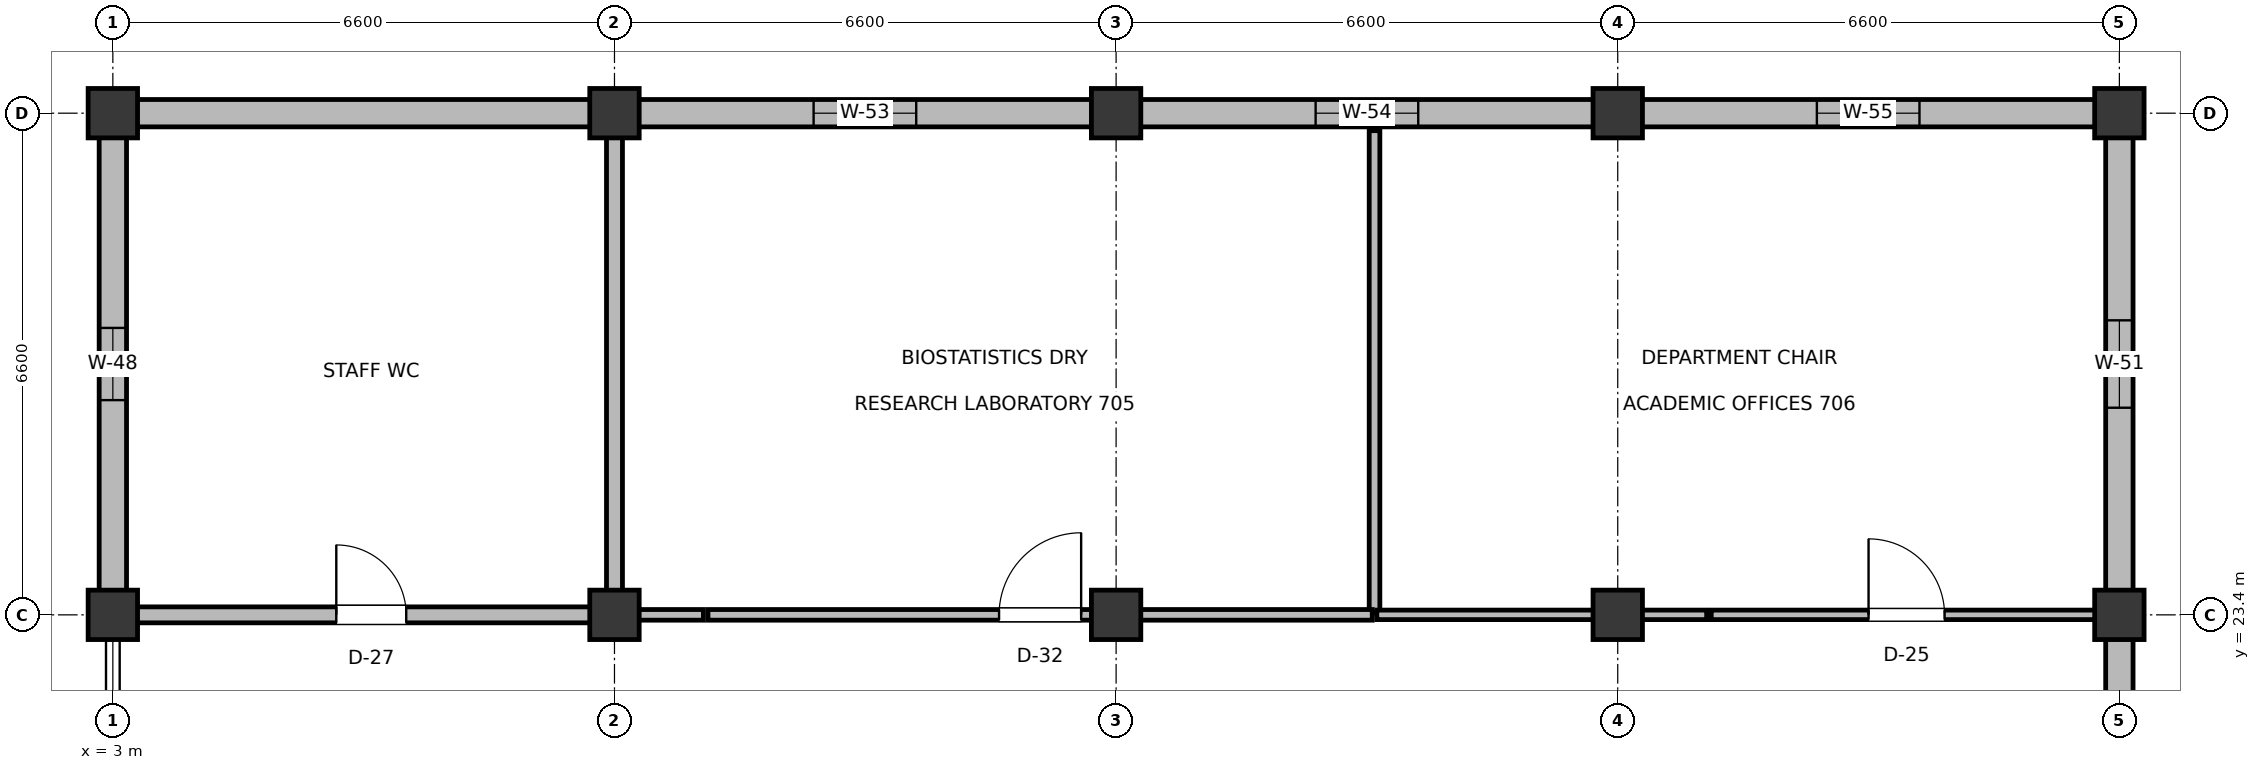
"""IFC4 building model, lengths in metres.
Left out: names, types, materials, properties, quantities, classifications, styles, units other than length and angle.
Written with IfcOpenShell. Run it as: python <this file> out.ifc"""

import sys

from ifc_helpers import new_model, si_unit, direction, frame, frame_2d, origin, origin_2d, place, context, subcontext, project, spatial, rectangle, extrude, element, fill, save


model = new_model("IFC4")
c1 = context("Model", 3, precision=1e-05, world=origin(), true_north=direction((0.0, 1.0)))
c2 = subcontext(c1, "Body", "Model", "MODEL_VIEW")
j1 = project(units=[si_unit("LENGTHUNIT", "METRE"), si_unit("PLANEANGLEUNIT", "RADIAN")], contexts=[c1])
p1 = place(None, origin())
s1 = spatial("IfcSite", under=j1, at=p1, CompositionType="ELEMENT")
p2 = place(p1, origin())
s2 = spatial("IfcBuilding", under=s1, at=p2, CompositionType="ELEMENT")
p3 = place(p2, frame((0.0, 0.0, 33.0)))
s3 = spatial("IfcBuildingStorey", under=s2, at=p3, CompositionType="ELEMENT", Elevation=33.0)
for number, where, z_axis, x_axis in (
    (1, (3.0, 23.4, 0.0), (0.0, 0.0, 1.0), (1.0, 0.0, 0.0)),
    (2, (3.0, 30.0, 0.0), (0.0, 0.0, 1.0), (1.0, 0.0, 0.0)),
    (3, (9.6, 23.4, 0.0), (0.0, 0.0, 1.0), (1.0, 0.0, 0.0)),
    (4, (9.6, 30.0, 0.0), (0.0, 0.0, 1.0), (1.0, 0.0, 0.0)),
    (5, (16.2, 23.4, 0.0), (0.0, 0.0, 1.0), (1.0, 0.0, 0.0)),
    (6, (16.2, 30.0, 0.0), (0.0, 0.0, 1.0), (1.0, 0.0, 0.0)),
    (7, (22.8, 23.4, 0.0), (0.0, 0.0, 1.0), (1.0, 0.0, 0.0)),
    (8, (22.8, 30.0, 0.0), (0.0, 0.0, 1.0), (1.0, 0.0, 0.0)),
    (9, (29.4, 23.4, 0.0), (0.0, 0.0, 1.0), (1.0, 0.0, 0.0)),
    (10, (29.4, 30.0, 0.0), (0.0, 0.0, 1.0), (1.0, 0.0, 0.0)),
):
    element("IfcColumn", number, at=place(p3, frame(where, z_axis=z_axis, x_axis=x_axis)), inside=s3, PredefinedType="COLUMN", context=c2, shape_type="SweptSolid", body=[
        extrude(rectangle(XDim=0.65, YDim=0.65, at=origin_2d()), origin(), (0.0, 0.0, 1.0), 3.8),
    ])
p4 = place(p3, frame((3.0, 23.705, 0.0), z_axis=(0.0, 0.0, 1.0), x_axis=(0.0, 1.0, 0.0)))
e11 = element("IfcWall", 11, at=p4, inside=s3, PredefinedType="SOLIDWALL", context=c2, shape_type="SweptSolid", body=[
    extrude(rectangle(XDim=5.99, YDim=0.36, at=frame_2d((2.995, 0.0))), origin(), (0.0, 0.0, 1.0), 2.825),
])
p5 = place(p4, frame((2.52, 0.0, 0.9)))
e12 = element("IfcOpeningElement", 12, at=p5, cuts=e11, PredefinedType="OPENING", context=c2, shape_type="SweptSolid", body=[
    extrude(rectangle(XDim=0.95, YDim=1.75, at=frame_2d((0.475, 0.875))), frame((0.0, 0.19, 0.0), z_axis=(0.0, -1.0, 0.0), x_axis=(1.0, 0.0, 0.0)), (0.0, 0.0, 1.0), 0.38),
])
p6 = place(p3, frame((29.4, 9.315, 0.0), z_axis=(0.0, 0.0, 1.0), x_axis=(0.0, 1.0, 0.0)))
e13 = element("IfcWall", 13, at=p6, inside=s3, PredefinedType="SOLIDWALL", context=c2, shape_type="SweptSolid", body=[
    extrude(rectangle(XDim=13.77, YDim=0.36, at=frame_2d((6.885, 0.0))), origin(), (0.0, 0.0, 1.0), 2.725),
])
p7 = place(p6, frame((6.31, 0.0, 0.9)))
e14 = element("IfcOpeningElement", 14, at=p7, cuts=e13, PredefinedType="OPENING", context=c2, shape_type="SweptSolid", body=[
    extrude(rectangle(XDim=1.15, YDim=1.35, at=frame_2d((0.575, 0.675))), frame((0.0, 0.19, 0.0), z_axis=(0.0, -1.0, 0.0), x_axis=(1.0, 0.0, 0.0)), (0.0, 0.0, 1.0), 0.38),
])
p8 = place(p3, frame((29.4, 23.705, 0.0), z_axis=(0.0, 0.0, 1.0), x_axis=(0.0, 1.0, 0.0)))
e15 = element("IfcWall", 15, at=p8, inside=s3, PredefinedType="SOLIDWALL", context=c2, shape_type="SweptSolid", body=[
    extrude(rectangle(XDim=5.99, YDim=0.36, at=frame_2d((2.995, 0.0))), origin(), (0.0, 0.0, 1.0), 2.875),
])
p9 = place(p8, frame((2.42, 0.0, 0.9)))
e16 = element("IfcOpeningElement", 16, at=p9, cuts=e15, PredefinedType="OPENING", context=c2, shape_type="SweptSolid", body=[
    extrude(rectangle(XDim=1.15, YDim=1.55, at=frame_2d((0.575, 0.775))), frame((0.0, 0.19, 0.0), z_axis=(0.0, -1.0, 0.0), x_axis=(1.0, 0.0, 0.0)), (0.0, 0.0, 1.0), 0.38),
])
p10 = place(p3, frame((3.305, 30.0, 0.0), z_axis=(0.0, 0.0, 1.0), x_axis=(1.0, 0.0, 0.0)))
e17 = element("IfcWall", 17, at=p10, inside=s3, PredefinedType="SOLIDWALL", context=c2, shape_type="SweptSolid", body=[
    extrude(rectangle(XDim=5.98, YDim=0.36, at=frame_2d((2.99, 0.0))), origin(), (0.0, 0.0, 1.0), 2.605),
])
p11 = place(p3, frame((9.905, 30.0, 0.0), z_axis=(0.0, 0.0, 1.0), x_axis=(1.0, 0.0, 0.0)))
e18 = element("IfcWall", 18, at=p11, inside=s3, PredefinedType="SOLIDWALL", context=c2, shape_type="SweptSolid", body=[
    extrude(rectangle(XDim=5.98, YDim=0.36, at=frame_2d((2.99, 0.0))), origin(), (0.0, 0.0, 1.0), 2.775),
])
p12 = place(p11, frame((2.315, 0.0, 0.9)))
e19 = element("IfcOpeningElement", 19, at=p12, cuts=e18, PredefinedType="OPENING", context=c2, shape_type="SweptSolid", body=[
    extrude(rectangle(XDim=1.35, YDim=1.15, at=frame_2d((0.675, 0.575))), frame((0.0, 0.19, 0.0), z_axis=(0.0, -1.0, 0.0), x_axis=(1.0, 0.0, 0.0)), (0.0, 0.0, 1.0), 0.38),
])
p13 = place(p3, frame((16.505, 30.0, 0.0), z_axis=(0.0, 0.0, 1.0), x_axis=(1.0, 0.0, 0.0)))
e20 = element("IfcWall", 20, at=p13, inside=s3, PredefinedType="SOLIDWALL", context=c2, shape_type="SweptSolid", body=[
    extrude(rectangle(XDim=5.99, YDim=0.36, at=frame_2d((2.995, 0.0))), origin(), (0.0, 0.0, 1.0), 3.005),
])
p14 = place(p13, frame((2.32, 0.0, 0.9)))
e21 = element("IfcOpeningElement", 21, at=p14, cuts=e20, PredefinedType="OPENING", context=c2, shape_type="SweptSolid", body=[
    extrude(rectangle(XDim=1.35, YDim=1.35, at=frame_2d((0.675, 0.675))), frame((0.0, 0.19, 0.0), z_axis=(0.0, -1.0, 0.0), x_axis=(1.0, 0.0, 0.0)), (0.0, 0.0, 1.0), 0.38),
])
p15 = place(p3, frame((23.105, 30.0, 0.0), z_axis=(0.0, 0.0, 1.0), x_axis=(1.0, 0.0, 0.0)))
e22 = element("IfcWall", 22, at=p15, inside=s3, PredefinedType="SOLIDWALL", context=c2, shape_type="SweptSolid", body=[
    extrude(rectangle(XDim=5.98, YDim=0.36, at=frame_2d((2.99, 0.0))), origin(), (0.0, 0.0, 1.0), 2.775),
])
p16 = place(p15, frame((2.315, 0.0, 0.9)))
e23 = element("IfcOpeningElement", 23, at=p16, cuts=e22, PredefinedType="OPENING", context=c2, shape_type="SweptSolid", body=[
    extrude(rectangle(XDim=1.35, YDim=1.55, at=frame_2d((0.675, 0.775))), frame((0.0, 0.19, 0.0), z_axis=(0.0, -1.0, 0.0), x_axis=(1.0, 0.0, 0.0)), (0.0, 0.0, 1.0), 0.38),
])
p17 = place(p3, frame((9.6, 23.43, 0.0), z_axis=(0.0, 0.0, 1.0), x_axis=(0.0, 1.0, 0.0)))
e24 = element("IfcWall", 24, at=p17, inside=s3, PredefinedType="PLUMBINGWALL", context=c2, shape_type="SweptSolid", body=[
    extrude(rectangle(XDim=6.34, YDim=0.21, at=frame_2d((3.17, 0.0))), origin(), (0.0, 0.0, 1.0), 2.875),
])
p18 = place(p3, frame((3.23, 23.4, 0.0), z_axis=(0.0, 0.0, 1.0), x_axis=(1.0, 0.0, 0.0)))
e25 = element("IfcWall", 25, at=p18, inside=s3, PredefinedType="PLUMBINGWALL", context=c2, shape_type="SweptSolid", body=[
    extrude(rectangle(XDim=6.34, YDim=0.21, at=frame_2d((3.17, 0.0))), origin(), (0.0, 0.0, 1.0), 2.665),
])
p19 = place(p18, frame((2.71, 0.0, 0.0)))
e26 = element("IfcOpeningElement", 26, at=p19, cuts=e25, PredefinedType="OPENING", context=c2, shape_type="SweptSolid", body=[
    extrude(rectangle(XDim=0.92, YDim=2.1, at=frame_2d((0.46, 1.05))), frame((0.0, 0.115, 0.0), z_axis=(0.0, -1.0, 0.0), x_axis=(1.0, 0.0, 0.0)), (0.0, 0.0, 1.0), 0.23),
])
p20 = place(p3, frame((19.6, 23.43, 0.0), z_axis=(0.0, 0.0, 1.0), x_axis=(0.0, 1.0, 0.0)))
e27 = element("IfcWall", 27, at=p20, inside=s3, PredefinedType="PARTITIONING", context=c2, shape_type="SweptSolid", body=[
    extrude(rectangle(XDim=6.34, YDim=0.14, at=frame_2d((3.17, 0.0))), origin(), (0.0, 0.0, 1.0), 2.645),
])
p21 = place(p3, frame((9.63, 23.4, 0.0), z_axis=(0.0, 0.0, 1.0), x_axis=(1.0, 0.0, 0.0)))
e28 = element("IfcWall", 28, at=p21, inside=s3, PredefinedType="PARTITIONING", context=c2, shape_type="SweptSolid", body=[
    extrude(rectangle(XDim=1.14, YDim=0.14, at=frame_2d((0.57, 0.0))), origin(), (0.0, 0.0, 1.0), 2.775),
])
p22 = place(p3, frame((10.83, 23.4, 0.0), z_axis=(0.0, 0.0, 1.0), x_axis=(1.0, 0.0, 0.0)))
e29 = element("IfcWall", 29, at=p22, inside=s3, PredefinedType="PARTITIONING", context=c2, shape_type="SweptSolid", body=[
    extrude(rectangle(XDim=8.74, YDim=0.14, at=frame_2d((4.37, 0.0))), origin(), (0.0, 0.0, 1.0), 2.645),
])
p23 = place(p22, frame((3.83, 0.0, 0.0)))
e30 = element("IfcOpeningElement", 30, at=p23, cuts=e29, PredefinedType="OPENING", context=c2, shape_type="SweptSolid", body=[
    extrude(rectangle(XDim=1.08, YDim=2.15, at=frame_2d((0.54, 1.075))), frame((0.0, 0.08, 0.0), z_axis=(0.0, -1.0, 0.0), x_axis=(1.0, 0.0, 0.0)), (0.0, 0.0, 1.0), 0.16),
])
p24 = place(p3, frame((24.03, 23.4, 0.0), z_axis=(0.0, 0.0, 1.0), x_axis=(1.0, 0.0, 0.0)))
e31 = element("IfcWall", 31, at=p24, inside=s3, PredefinedType="PARTITIONING", context=c2, shape_type="SweptSolid", body=[
    extrude(rectangle(XDim=5.14, YDim=0.125, at=frame_2d((2.57, 0.0))), origin(), (0.0, 0.0, 1.0), 2.775),
])
p25 = place(p24, frame((2.07, 0.0, 0.0)))
e32 = element("IfcOpeningElement", 32, at=p25, cuts=e31, PredefinedType="OPENING", context=c2, shape_type="SweptSolid", body=[
    extrude(rectangle(XDim=1.0, YDim=2.15, at=frame_2d((0.5, 1.075))), frame((0.0, 0.073, 0.0), z_axis=(0.0, -1.0, 0.0), x_axis=(1.0, 0.0, 0.0)), (0.0, 0.0, 1.0), 0.145),
])
p26 = place(p3, frame((19.63, 23.4, 0.0), z_axis=(0.0, 0.0, 1.0), x_axis=(1.0, 0.0, 0.0)))
e33 = element("IfcWall", 33, at=p26, inside=s3, PredefinedType="PARTITIONING", context=c2, shape_type="SweptSolid", body=[
    extrude(rectangle(XDim=4.34, YDim=0.125, at=frame_2d((2.17, 0.0))), origin(), (0.0, 0.0, 1.0), 2.645),
])
p27 = place(p5, origin())
e34 = element("IfcWindow", 34, at=p27, inside=s3, PartitioningType="DOUBLE_PANEL_VERTICAL", PredefinedType="WINDOW", context=c2, shape_type="SweptSolid", body=[
    extrude(rectangle(XDim=0.95, YDim=1.75, at=frame_2d((0.475, 0.875))), frame((0.0, 0.03, 0.0), z_axis=(0.0, -1.0, 0.0), x_axis=(1.0, 0.0, 0.0)), (0.0, 0.0, 1.0), 0.06),
])
fill(e12, e34)
p28 = place(p9, frame((1.15, 0.0, 0.0), z_axis=(0.0, 0.0, 1.0), x_axis=(-1.0, 0.0, 0.0)))
e35 = element("IfcWindow", 35, at=p28, inside=s3, PartitioningType="DOUBLE_PANEL_VERTICAL", PredefinedType="WINDOW", context=c2, shape_type="SweptSolid", body=[
    extrude(rectangle(XDim=1.15, YDim=1.55, at=frame_2d((0.575, 0.775))), frame((0.0, 0.03, 0.0), z_axis=(0.0, -1.0, 0.0), x_axis=(1.0, 0.0, 0.0)), (0.0, 0.0, 1.0), 0.06),
])
fill(e16, e35)
p29 = place(p12, origin())
e36 = element("IfcWindow", 36, at=p29, inside=s3, PartitioningType="DOUBLE_PANEL_VERTICAL", PredefinedType="WINDOW", context=c2, shape_type="SweptSolid", body=[
    extrude(rectangle(XDim=1.35, YDim=1.15, at=frame_2d((0.675, 0.575))), frame((0.0, 0.03, 0.0), z_axis=(0.0, -1.0, 0.0), x_axis=(1.0, 0.0, 0.0)), (0.0, 0.0, 1.0), 0.06),
])
fill(e19, e36)
p30 = place(p14, origin())
e37 = element("IfcWindow", 37, at=p30, inside=s3, PartitioningType="DOUBLE_PANEL_VERTICAL", PredefinedType="WINDOW", context=c2, shape_type="SweptSolid", body=[
    extrude(rectangle(XDim=1.35, YDim=1.35, at=frame_2d((0.675, 0.675))), frame((0.0, 0.03, 0.0), z_axis=(0.0, -1.0, 0.0), x_axis=(1.0, 0.0, 0.0)), (0.0, 0.0, 1.0), 0.06),
])
fill(e21, e37)
p31 = place(p16, origin())
e38 = element("IfcWindow", 38, at=p31, inside=s3, PartitioningType="DOUBLE_PANEL_VERTICAL", PredefinedType="WINDOW", context=c2, shape_type="SweptSolid", body=[
    extrude(rectangle(XDim=1.35, YDim=1.55, at=frame_2d((0.675, 0.775))), frame((0.0, 0.03, 0.0), z_axis=(0.0, -1.0, 0.0), x_axis=(1.0, 0.0, 0.0)), (0.0, 0.0, 1.0), 0.06),
])
fill(e23, e38)
p32 = place(p19, origin())
e39 = element("IfcDoor", 39, at=p32, inside=s3, OperationType="SINGLE_SWING_LEFT", PredefinedType="DOOR", context=c2, shape_type="SweptSolid", body=[
    extrude(rectangle(XDim=0.92, YDim=2.1, at=frame_2d((0.46, 1.05))), frame((0.0, 0.025, 0.0), z_axis=(0.0, -1.0, 0.0), x_axis=(1.0, 0.0, 0.0)), (0.0, 0.0, 1.0), 0.05),
])
fill(e26, e39)
p33 = place(p23, origin())
e40 = element("IfcDoor", 40, at=p33, inside=s3, OperationType="SINGLE_SWING_RIGHT", PredefinedType="DOOR", context=c2, shape_type="SweptSolid", body=[
    extrude(rectangle(XDim=1.08, YDim=2.15, at=frame_2d((0.54, 1.075))), frame((0.0, 0.025, 0.0), z_axis=(0.0, -1.0, 0.0), x_axis=(1.0, 0.0, 0.0)), (0.0, 0.0, 1.0), 0.05),
])
fill(e30, e40)
p34 = place(p25, origin())
e41 = element("IfcDoor", 41, at=p34, inside=s3, OperationType="SINGLE_SWING_LEFT", PredefinedType="DOOR", context=c2, shape_type="SweptSolid", body=[
    extrude(rectangle(XDim=1.0, YDim=2.15, at=frame_2d((0.5, 1.075))), frame((0.0, 0.025, 0.0), z_axis=(0.0, -1.0, 0.0), x_axis=(1.0, 0.0, 0.0)), (0.0, 0.0, 1.0), 0.05),
])
fill(e32, e41)
save(model, sys.argv[1])
